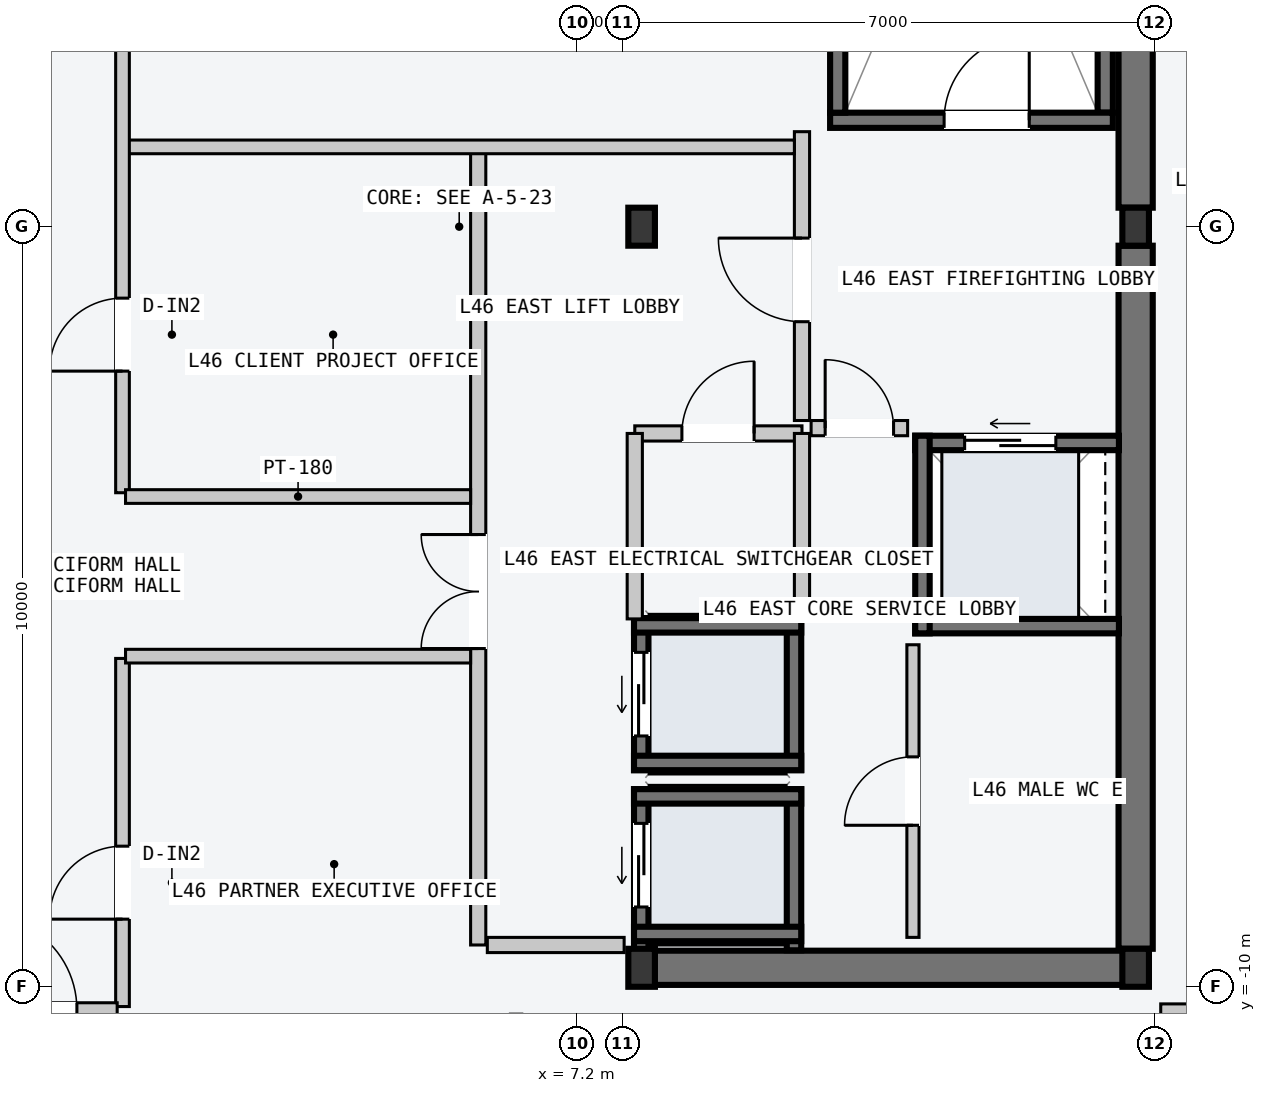
"""IFC4 building model, lengths in metres.
Left out: names, types, materials, properties, quantities, classifications, styles, units other than length and angle.
Written with IfcOpenShell. Run it as: python <this file> out.ifc"""

import sys

from ifc_helpers import new_model, si_unit, direction, frame, frame_2d, origin, origin_2d, place, context, subcontext, project, spatial, rectangle, i_section, extrude, element, fill, save


model = new_model("IFC4")
c1 = context("Model", 3, precision=1e-05, world=origin(), true_north=direction((0.0, 1.0)))
c2 = subcontext(c1, "Body", "Model", "MODEL_VIEW")
j1 = project(units=[si_unit("LENGTHUNIT", "METRE"), si_unit("PLANEANGLEUNIT", "RADIAN")], contexts=[c1])
p1 = place(None, origin())
s1 = spatial("IfcSite", under=j1, at=p1, CompositionType="ELEMENT")
p2 = place(p1, origin())
s2 = spatial("IfcBuilding", under=s1, at=p2, CompositionType="ELEMENT")
p3 = place(p2, frame((0.0, 0.0, 176.7)))
s3 = spatial("IfcBuildingStorey", under=s2, at=p3, CompositionType="ELEMENT", Elevation=176.7)
p4 = place(p3, frame((8.07, -9.75, -0.2), z_axis=(0.0, 0.0, 1.0), x_axis=(1.0, 0.0, 0.0)))
e1 = element("IfcWall", 1, at=p4, inside=s3, PredefinedType="SHEAR", context=c2, shape_type="SweptSolid", body=[
    extrude(rectangle(XDim=6.46, YDim=0.45, at=frame_2d((3.23, 0.0))), origin(), (0.0, 0.0, 1.0), 3.6),
])
for number, where, z_axis, x_axis in (
    (2, (14.55, -9.5, -0.2), (0.0, 0.0, 1.0), (0.0, 1.0, 0.0)),
    (3, (14.55, 0.25, -0.2), (0.0, 0.0, 1.0), (0.0, 1.0, 0.0)),
):
    element("IfcWall", number, at=place(p3, frame(where, z_axis=z_axis, x_axis=x_axis)), inside=s3, PredefinedType="SHEAR", context=c2, shape_type="SweptSolid", body=[
        extrude(rectangle(XDim=9.25, YDim=0.45, at=frame_2d((4.625, 0.0))), origin(), (0.0, 0.0, 1.0), 3.6),
    ])
p5 = place(p3, frame((14.15, 1.5, -0.2), z_axis=(0.0, 0.0, 1.0), x_axis=(0.0, 1.0, 0.0)))
e4 = element("IfcWall", 4, at=p5, inside=s3, PredefinedType="SOLIDWALL", context=c2, shape_type="SweptSolid", body=[
    extrude(rectangle(XDim=7.8, YDim=0.2, at=frame_2d((3.9, 0.0))), origin(), (0.0, 0.0, 1.0), 3.6),
])
p6 = place(p3, frame((10.53, 1.4, -0.2), z_axis=(0.0, 0.0, 1.0), x_axis=(1.0, 0.0, 0.0)))
e5 = element("IfcWall", 5, at=p6, inside=s3, PredefinedType="SOLIDWALL", context=c2, shape_type="SweptSolid", body=[
    extrude(rectangle(XDim=3.72, YDim=0.2, at=frame_2d((1.86, 0.0))), origin(), (0.0, 0.0, 1.0), 3.6),
])
p7 = place(p6, frame((1.5, 0.0, 0.2)))
e6 = element("IfcOpeningElement", 6, at=p7, cuts=e5, PredefinedType="OPENING", context=c2, shape_type="SweptSolid", body=[
    extrude(rectangle(XDim=1.12, YDim=2.18, at=frame_2d((0.56, 1.09))), frame((0.0, 0.11, 0.0), z_axis=(0.0, -1.0, 0.0), x_axis=(1.0, 0.0, 0.0)), (0.0, 0.0, 1.0), 0.22),
])
p8 = place(p3, frame((10.63, 1.5, -0.2), z_axis=(0.0, 0.0, 1.0), x_axis=(0.0, 1.0, 0.0)))
e7 = element("IfcWall", 7, at=p8, inside=s3, PredefinedType="SOLIDWALL", context=c2, shape_type="SweptSolid", body=[
    extrude(rectangle(XDim=7.8, YDim=0.2, at=frame_2d((3.9, 0.0))), origin(), (0.0, 0.0, 1.0), 3.6),
])
for number, where, z_axis, x_axis in (
    (8, (8.05, -9.75, 0.0), (0.0, 0.0, 1.0), (1.0, 0.0, 0.0)),
    (9, (8.05, 0.0, 0.0), (0.0, 0.0, 1.0), (1.0, 0.0, 0.0)),
    (10, (14.55, -9.75, 0.0), (0.0, 0.0, 1.0), (1.0, 0.0, 0.0)),
    (11, (14.55, 0.0, 0.0), (0.0, 0.0, 1.0), (1.0, 0.0, 0.0)),
):
    element("IfcColumn", number, at=place(p3, frame(where, z_axis=z_axis, x_axis=x_axis)), inside=s3, PredefinedType="COLUMN", context=c2, shape_type="SweptSolid", body=[
        extrude(i_section(OverallWidth=0.35, OverallDepth=0.5, WebThickness=0.02, FlangeThickness=0.032, at=origin_2d()), origin(), (0.0, 0.0, 1.0), 3.6),
    ])
p9 = place(p3, frame((8.045, -9.52, -0.2), z_axis=(0.0, 0.0, 1.0), x_axis=(0.0, 1.0, 0.0)))
e12 = element("IfcWall", 12, at=p9, inside=s3, PredefinedType="SOLIDWALL", context=c2, shape_type="SweptSolid", body=[
    extrude(rectangle(XDim=2.12, YDim=0.19, at=frame_2d((1.06, 0.0))), origin(), (0.0, 0.0, 1.0), 3.6),
])
p10 = place(p9, frame((0.57, 0.0, 0.2)))
e13 = element("IfcOpeningElement", 13, at=p10, cuts=e12, PredefinedType="OPENING", context=c2, shape_type="SweptSolid", body=[
    extrude(rectangle(XDim=1.1, YDim=2.2, at=frame_2d((0.55, 1.1))), frame((0.0, 0.105, 0.0), z_axis=(0.0, -1.0, 0.0), x_axis=(1.0, 0.0, 0.0)), (0.0, 0.0, 1.0), 0.21),
])
p11 = place(p3, frame((10.055, -9.52, -0.2), z_axis=(0.0, 0.0, 1.0), x_axis=(0.0, 1.0, 0.0)))
e14 = element("IfcWall", 14, at=p11, inside=s3, PredefinedType="SOLIDWALL", context=c2, shape_type="SweptSolid", body=[
    extrude(rectangle(XDim=2.12, YDim=0.19, at=frame_2d((1.06, 0.0))), origin(), (0.0, 0.0, 1.0), 3.6),
])
for number, where, z_axis, x_axis in (
    (15, (7.95, -7.495, -0.2), (0.0, 0.0, 1.0), (1.0, 0.0, 0.0)),
    (16, (7.95, -9.305, -0.2), (0.0, 0.0, 1.0), (1.0, 0.0, 0.0)),
):
    element("IfcWall", number, at=place(p3, frame(where, z_axis=z_axis, x_axis=x_axis)), inside=s3, PredefinedType="SOLIDWALL", context=c2, shape_type="SweptSolid", body=[
        extrude(rectangle(XDim=2.2, YDim=0.19, at=frame_2d((1.1, 0.0))), origin(), (0.0, 0.0, 1.0), 3.6),
    ])
p12 = place(p3, frame((8.045, -7.15, -0.2), z_axis=(0.0, 0.0, 1.0), x_axis=(0.0, 1.0, 0.0)))
e17 = element("IfcWall", 17, at=p12, inside=s3, PredefinedType="SOLIDWALL", context=c2, shape_type="SweptSolid", body=[
    extrude(rectangle(XDim=2.0, YDim=0.19, at=frame_2d((1.0, 0.0))), origin(), (0.0, 0.0, 1.0), 3.6),
])
p13 = place(p12, frame((0.45, 0.0, 0.2)))
e18 = element("IfcOpeningElement", 18, at=p13, cuts=e17, PredefinedType="OPENING", context=c2, shape_type="SweptSolid", body=[
    extrude(rectangle(XDim=1.1, YDim=2.2, at=frame_2d((0.55, 1.1))), frame((0.0, 0.105, 0.0), z_axis=(0.0, -1.0, 0.0), x_axis=(1.0, 0.0, 0.0)), (0.0, 0.0, 1.0), 0.21),
])
p14 = place(p3, frame((10.055, -7.15, -0.2), z_axis=(0.0, 0.0, 1.0), x_axis=(0.0, 1.0, 0.0)))
e19 = element("IfcWall", 19, at=p14, inside=s3, PredefinedType="SOLIDWALL", context=c2, shape_type="SweptSolid", body=[
    extrude(rectangle(XDim=2.0, YDim=0.19, at=frame_2d((1.0, 0.0))), origin(), (0.0, 0.0, 1.0), 3.6),
])
for number, where, z_axis, x_axis in (
    (20, (7.95, -5.245, -0.2), (0.0, 0.0, 1.0), (1.0, 0.0, 0.0)),
    (21, (7.95, -7.055, -0.2), (0.0, 0.0, 1.0), (1.0, 0.0, 0.0)),
):
    element("IfcWall", number, at=place(p3, frame(where, z_axis=z_axis, x_axis=x_axis)), inside=s3, PredefinedType="SOLIDWALL", context=c2, shape_type="SweptSolid", body=[
        extrude(rectangle(XDim=2.2, YDim=0.19, at=frame_2d((1.1, 0.0))), origin(), (0.0, 0.0, 1.0), 3.6),
    ])
p15 = place(p3, frame((11.65, -2.845, -0.2), z_axis=(0.0, 0.0, 1.0), x_axis=(1.0, 0.0, 0.0)))
e22 = element("IfcWall", 22, at=p15, inside=s3, PredefinedType="SOLIDWALL", context=c2, shape_type="SweptSolid", body=[
    extrude(rectangle(XDim=2.68, YDim=0.19, at=frame_2d((1.34, 0.0))), origin(), (0.0, 0.0, 1.0), 3.6),
])
p16 = place(p15, frame((0.65, 0.0, 0.2)))
e23 = element("IfcOpeningElement", 23, at=p16, cuts=e22, PredefinedType="OPENING", context=c2, shape_type="SweptSolid", body=[
    extrude(rectangle(XDim=1.2, YDim=2.2, at=frame_2d((0.6, 1.1))), frame((0.0, 0.105, 0.0), z_axis=(0.0, -1.0, 0.0), x_axis=(1.0, 0.0, 0.0)), (0.0, 0.0, 1.0), 0.21),
])
p17 = place(p3, frame((11.65, -5.255, -0.2), z_axis=(0.0, 0.0, 1.0), x_axis=(1.0, 0.0, 0.0)))
e24 = element("IfcWall", 24, at=p17, inside=s3, PredefinedType="SOLIDWALL", context=c2, shape_type="SweptSolid", body=[
    extrude(rectangle(XDim=2.68, YDim=0.19, at=frame_2d((1.34, 0.0))), origin(), (0.0, 0.0, 1.0), 3.6),
])
p18 = place(p3, frame((11.745, -5.35, -0.2), z_axis=(0.0, 0.0, 1.0), x_axis=(0.0, 1.0, 0.0)))
e25 = element("IfcWall", 25, at=p18, inside=s3, PredefinedType="SOLIDWALL", context=c2, shape_type="SweptSolid", body=[
    extrude(rectangle(XDim=2.6, YDim=0.19, at=frame_2d((1.3, 0.0))), origin(), (0.0, 0.0, 1.0), 3.6),
])
p19 = place(p3, frame((5.9, -9.45, 0.0), z_axis=(0.0, 0.0, 1.0), x_axis=(0.0, 1.0, 0.0)))
e26 = element("IfcWall", 26, at=p19, inside=s3, PredefinedType="PARTITIONING", context=c2, shape_type="SweptSolid", body=[
    extrude(rectangle(XDim=10.5, YDim=0.2, at=frame_2d((5.25, 0.0))), origin(), (0.0, 0.0, 1.0), 3.4),
])
p20 = place(p19, frame((3.9, 0.0, 0.0)))
e27 = element("IfcOpeningElement", 27, at=p20, cuts=e26, PredefinedType="OPENING", context=c2, shape_type="SweptSolid", body=[
    extrude(rectangle(XDim=1.5, YDim=2.2, at=frame_2d((0.75, 1.1))), frame((0.0, 0.11, 0.0), z_axis=(0.0, -1.0, 0.0), x_axis=(1.0, 0.0, 0.0)), (0.0, 0.0, 1.0), 0.22),
])
p21 = place(p3, frame((6.02, -9.45, 0.0), z_axis=(0.0, 0.0, 1.0), x_axis=(1.0, 0.0, 0.0)))
e28 = element("IfcWall", 28, at=p21, inside=s3, PredefinedType="PARTITIONING", context=c2, shape_type="SweptSolid", body=[
    extrude(rectangle(XDim=1.8, YDim=0.2, at=frame_2d((0.9, 0.0))), origin(), (0.0, 0.0, 1.0), 3.4),
])
p22 = place(p3, frame((10.16, -2.55, 0.0), z_axis=(0.0, 0.0, 1.0), x_axis=(0.0, 1.0, 0.0)))
e29 = element("IfcWall", 29, at=p22, inside=s3, PredefinedType="PARTITIONING", context=c2, shape_type="SweptSolid", body=[
    extrude(rectangle(XDim=3.8, YDim=0.2, at=frame_2d((1.9, 0.0))), origin(), (0.0, 0.0, 1.0), 3.4),
])
p23 = place(p22, frame((1.3, 0.0, 0.0)))
e30 = element("IfcOpeningElement", 30, at=p23, cuts=e29, PredefinedType="OPENING", context=c2, shape_type="SweptSolid", body=[
    extrude(rectangle(XDim=1.1, YDim=2.15, at=frame_2d((0.55, 1.075))), frame((0.0, 0.11, 0.0), z_axis=(0.0, -1.0, 0.0), x_axis=(1.0, 0.0, 0.0)), (0.0, 0.0, 1.0), 0.22),
])
p24 = place(p3, frame((10.28, -2.65, 0.0), z_axis=(0.0, 0.0, 1.0), x_axis=(1.0, 0.0, 0.0)))
e31 = element("IfcWall", 31, at=p24, inside=s3, PredefinedType="PARTITIONING", context=c2, shape_type="SweptSolid", body=[
    extrude(rectangle(XDim=1.27, YDim=0.2, at=frame_2d((0.635, 0.0))), origin(), (0.0, 0.0, 1.0), 3.4),
])
p25 = place(p24, frame((0.185, 0.0, 0.0)))
e32 = element("IfcOpeningElement", 32, at=p25, cuts=e31, PredefinedType="OPENING", context=c2, shape_type="SweptSolid", body=[
    extrude(rectangle(XDim=0.9, YDim=2.15, at=frame_2d((0.45, 1.075))), frame((0.0, 0.11, 0.0), z_axis=(0.0, -1.0, 0.0), x_axis=(1.0, 0.0, 0.0)), (0.0, 0.0, 1.0), 0.22),
])
p26 = place(p3, frame((7.96, -2.72, 0.0), z_axis=(0.0, 0.0, 1.0), x_axis=(1.0, 0.0, 0.0)))
e33 = element("IfcWall", 33, at=p26, inside=s3, PredefinedType="PARTITIONING", context=c2, shape_type="SweptSolid", body=[
    extrude(rectangle(XDim=2.2, YDim=0.2, at=frame_2d((1.1, 0.0))), origin(), (0.0, 0.0, 1.0), 3.4),
])
p27 = place(p26, frame((0.62, 0.0, 0.0)))
e34 = element("IfcOpeningElement", 34, at=p27, cuts=e33, PredefinedType="OPENING", context=c2, shape_type="SweptSolid", body=[
    extrude(rectangle(XDim=0.95, YDim=2.1, at=frame_2d((0.475, 1.05))), frame((0.0, 0.11, 0.0), z_axis=(0.0, -1.0, 0.0), x_axis=(1.0, 0.0, 0.0)), (0.0, 0.0, 1.0), 0.22),
])
for number, where, z_axis, x_axis in (
    (35, (7.96, -5.16, 0.0), (0.0, 0.0, 1.0), (0.0, 1.0, 0.0)),
    (36, (10.16, -5.16, 0.0), (0.0, 0.0, 1.0), (0.0, 1.0, 0.0)),
):
    element("IfcWall", number, at=place(p3, frame(where, z_axis=z_axis, x_axis=x_axis)), inside=s3, PredefinedType="PARTITIONING", context=c2, shape_type="SweptSolid", body=[
        extrude(rectangle(XDim=2.44, YDim=0.2, at=frame_2d((1.22, 0.0))), origin(), (0.0, 0.0, 1.0), 3.4),
    ])
p28 = place(p3, frame((11.62, -9.35, 0.0), z_axis=(0.0, 0.0, 1.0), x_axis=(0.0, 1.0, 0.0)))
e37 = element("IfcWall", 37, at=p28, inside=s3, PredefinedType="PARTITIONING", context=c2, shape_type="SweptSolid", body=[
    extrude(rectangle(XDim=3.85, YDim=0.16, at=frame_2d((1.925, 0.0))), origin(), (0.0, 0.0, 1.0), 3.4),
])
p29 = place(p28, frame((1.475, 0.0, 0.0)))
e38 = element("IfcOpeningElement", 38, at=p29, cuts=e37, PredefinedType="OPENING", context=c2, shape_type="SweptSolid", body=[
    extrude(rectangle(XDim=0.9, YDim=2.15, at=frame_2d((0.45, 1.075))), frame((0.0, 0.09, 0.0), z_axis=(0.0, -1.0, 0.0), x_axis=(1.0, 0.0, 0.0)), (0.0, 0.0, 1.0), 0.18),
])
p30 = place(p3, frame((1.26, 1.05, 0.0), z_axis=(0.0, 0.0, 1.0), x_axis=(1.0, 0.0, 0.0)))
e39 = element("IfcWall", 39, at=p30, inside=s3, PredefinedType="PARTITIONING", context=c2, shape_type="SweptSolid", body=[
    extrude(rectangle(XDim=8.8, YDim=0.18, at=frame_2d((4.4, 0.0))), origin(), (0.0, 0.0, 1.0), 3.4),
])
p31 = place(p3, frame((1.22, -3.5, 0.0), z_axis=(0.0, 0.0, 1.0), x_axis=(0.0, 1.0, 0.0)))
e40 = element("IfcWall", 40, at=p31, inside=s3, PredefinedType="PARTITIONING", context=c2, shape_type="SweptSolid", body=[
    extrude(rectangle(XDim=15.17, YDim=0.18, at=frame_2d((7.585, 0.0))), origin(), (0.0, 0.0, 1.0), 3.4),
])
p32 = place(p31, frame((6.1, 0.0, 0.0)))
e41 = element("IfcOpeningElement", 41, at=p32, cuts=e40, PredefinedType="OPENING", context=c2, shape_type="SweptSolid", body=[
    extrude(rectangle(XDim=1.24, YDim=2.24, at=frame_2d((0.62, 1.12))), frame((0.0, 0.1, 0.0), z_axis=(0.0, -1.0, 0.0), x_axis=(1.0, 0.0, 0.0)), (0.0, 0.0, 1.0), 0.2),
])
p33 = place(p31, frame((1.6, 0.0, 0.0)))
e42 = element("IfcOpeningElement", 42, at=p33, cuts=e40, PredefinedType="OPENING", context=c2, shape_type="SweptSolid", body=[
    extrude(rectangle(XDim=0.96, YDim=2.18, at=frame_2d((0.48, 1.09))), frame((0.0, 0.1, 0.0), z_axis=(0.0, -1.0, 0.0), x_axis=(1.0, 0.0, 0.0)), (0.0, 0.0, 1.0), 0.2),
])
p34 = place(p3, frame((1.26, -3.55, 0.0), z_axis=(0.0, 0.0, 1.0), x_axis=(1.0, 0.0, 0.0)))
e43 = element("IfcWall", 43, at=p34, inside=s3, PredefinedType="PARTITIONING", context=c2, shape_type="SweptSolid", body=[
    extrude(rectangle(XDim=4.54, YDim=0.18, at=frame_2d((2.27, 0.0))), origin(), (0.0, 0.0, 1.0), 3.4),
])
p35 = place(p3, frame((1.22, -10.26, 0.0), z_axis=(0.0, 0.0, 1.0), x_axis=(0.0, 1.0, 0.0)))
e44 = element("IfcWall", 44, at=p35, inside=s3, PredefinedType="PARTITIONING", context=c2, shape_type="SweptSolid", body=[
    extrude(rectangle(XDim=4.58, YDim=0.18, at=frame_2d((2.29, 0.0))), origin(), (0.0, 0.0, 1.0), 3.4),
])
p36 = place(p35, frame((1.15, 0.0, 0.0)))
e45 = element("IfcOpeningElement", 45, at=p36, cuts=e44, PredefinedType="OPENING", context=c2, shape_type="SweptSolid", body=[
    extrude(rectangle(XDim=0.96, YDim=2.18, at=frame_2d((0.48, 1.09))), frame((0.0, 0.1, 0.0), z_axis=(0.0, -1.0, 0.0), x_axis=(1.0, 0.0, 0.0)), (0.0, 0.0, 1.0), 0.2),
])
p37 = place(p3, frame((1.26, -5.65, 0.0), z_axis=(0.0, 0.0, 1.0), x_axis=(1.0, 0.0, 0.0)))
e46 = element("IfcWall", 46, at=p37, inside=s3, PredefinedType="PARTITIONING", context=c2, shape_type="SweptSolid", body=[
    extrude(rectangle(XDim=4.54, YDim=0.18, at=frame_2d((2.27, 0.0))), origin(), (0.0, 0.0, 1.0), 3.4),
])
p38 = place(p3, frame((-1.15, -10.3, 0.0), z_axis=(0.0, 0.0, 1.0), x_axis=(1.0, 0.0, 0.0)))
e47 = element("IfcWall", 47, at=p38, inside=s3, PredefinedType="PARTITIONING", context=c2, shape_type="SweptSolid", body=[
    extrude(rectangle(XDim=2.3, YDim=0.18, at=frame_2d((1.15, 0.0))), origin(), (0.0, 0.0, 1.0), 3.4),
])
p39 = place(p38, frame((0.53, 0.0, 0.0)))
e48 = element("IfcOpeningElement", 48, at=p39, cuts=e47, PredefinedType="OPENING", context=c2, shape_type="SweptSolid", body=[
    extrude(rectangle(XDim=1.24, YDim=2.24, at=frame_2d((0.62, 1.12))), frame((0.0, 0.1, 0.0), z_axis=(0.0, -1.0, 0.0), x_axis=(1.0, 0.0, 0.0)), (0.0, 0.0, 1.0), 0.2),
])
p40 = place(p3, frame((14.88, -10.3, 0.0), z_axis=(0.0, 0.0, 1.0), x_axis=(1.0, 0.0, 0.0)))
e49 = element("IfcWall", 49, at=p40, inside=s3, PredefinedType="PARTITIONING", context=c2, shape_type="SweptSolid", body=[
    extrude(rectangle(XDim=5.68, YDim=0.15, at=frame_2d((2.84, 0.0))), origin(), (0.0, 0.0, 1.0), 3.4),
])
p41 = place(p40, frame((2.36, 0.0, 0.0)))
e50 = element("IfcOpeningElement", 50, at=p41, cuts=e49, PredefinedType="OPENING", context=c2, shape_type="SweptSolid", body=[
    extrude(rectangle(XDim=0.96, YDim=2.18, at=frame_2d((0.48, 1.09))), frame((0.0, 0.085, 0.0), z_axis=(0.0, -1.0, 0.0), x_axis=(1.0, 0.0, 0.0)), (0.0, 0.0, 1.0), 0.17),
])
p42 = place(p7, origin())
e51 = element("IfcDoor", 51, at=p42, inside=s3, OperationType="SINGLE_SWING_RIGHT", PredefinedType="DOOR", context=c2, shape_type="SweptSolid", body=[
    extrude(rectangle(XDim=1.12, YDim=2.18, at=frame_2d((0.56, 1.09))), frame((0.0, 0.025, 0.0), z_axis=(0.0, -1.0, 0.0), x_axis=(1.0, 0.0, 0.0)), (0.0, 0.0, 1.0), 0.05),
])
fill(e6, e51)
p43 = place(p10, origin())
e52 = element("IfcDoor", 52, at=p43, inside=s3, OperationType="SLIDING_TO_LEFT", PredefinedType="DOOR", context=c2, shape_type="SweptSolid", body=[
    extrude(rectangle(XDim=1.1, YDim=2.2, at=frame_2d((0.55, 1.1))), frame((0.0, 0.025, 0.0), z_axis=(0.0, -1.0, 0.0), x_axis=(1.0, 0.0, 0.0)), (0.0, 0.0, 1.0), 0.05),
])
fill(e13, e52)
p44 = place(p13, origin())
e53 = element("IfcDoor", 53, at=p44, inside=s3, OperationType="SLIDING_TO_LEFT", PredefinedType="DOOR", context=c2, shape_type="SweptSolid", body=[
    extrude(rectangle(XDim=1.1, YDim=2.2, at=frame_2d((0.55, 1.1))), frame((0.0, 0.025, 0.0), z_axis=(0.0, -1.0, 0.0), x_axis=(1.0, 0.0, 0.0)), (0.0, 0.0, 1.0), 0.05),
])
fill(e18, e53)
p45 = place(p16, origin())
e54 = element("IfcDoor", 54, at=p45, inside=s3, OperationType="SLIDING_TO_LEFT", PredefinedType="DOOR", context=c2, shape_type="SweptSolid", body=[
    extrude(rectangle(XDim=1.2, YDim=2.2, at=frame_2d((0.6, 1.1))), frame((0.0, 0.025, 0.0), z_axis=(0.0, -1.0, 0.0), x_axis=(1.0, 0.0, 0.0)), (0.0, 0.0, 1.0), 0.05),
])
fill(e23, e54)
p46 = place(p20, origin())
e55 = element("IfcDoor", 55, at=p46, inside=s3, OperationType="DOUBLE_DOOR_SINGLE_SWING", PredefinedType="DOOR", context=c2, shape_type="SweptSolid", body=[
    extrude(rectangle(XDim=1.5, YDim=2.2, at=frame_2d((0.75, 1.1))), frame((0.0, 0.025, 0.0), z_axis=(0.0, -1.0, 0.0), x_axis=(1.0, 0.0, 0.0)), (0.0, 0.0, 1.0), 0.05),
])
fill(e27, e55)
p47 = place(p23, origin())
e56 = element("IfcDoor", 56, at=p47, inside=s3, OperationType="SINGLE_SWING_RIGHT", PredefinedType="DOOR", context=c2, shape_type="SweptSolid", body=[
    extrude(rectangle(XDim=1.1, YDim=2.15, at=frame_2d((0.55, 1.075))), frame((0.0, 0.025, 0.0), z_axis=(0.0, -1.0, 0.0), x_axis=(1.0, 0.0, 0.0)), (0.0, 0.0, 1.0), 0.05),
])
fill(e30, e56)
p48 = place(p25, origin())
e57 = element("IfcDoor", 57, at=p48, inside=s3, OperationType="SINGLE_SWING_LEFT", PredefinedType="DOOR", context=c2, shape_type="SweptSolid", body=[
    extrude(rectangle(XDim=0.9, YDim=2.15, at=frame_2d((0.45, 1.075))), frame((0.0, 0.025, 0.0), z_axis=(0.0, -1.0, 0.0), x_axis=(1.0, 0.0, 0.0)), (0.0, 0.0, 1.0), 0.05),
])
fill(e32, e57)
p49 = place(p27, origin())
e58 = element("IfcDoor", 58, at=p49, inside=s3, OperationType="SINGLE_SWING_RIGHT", PredefinedType="DOOR", context=c2, shape_type="SweptSolid", body=[
    extrude(rectangle(XDim=0.95, YDim=2.1, at=frame_2d((0.475, 1.05))), frame((0.0, 0.025, 0.0), z_axis=(0.0, -1.0, 0.0), x_axis=(1.0, 0.0, 0.0)), (0.0, 0.0, 1.0), 0.05),
])
fill(e34, e58)
p50 = place(p29, origin())
e59 = element("IfcDoor", 59, at=p50, inside=s3, OperationType="SINGLE_SWING_LEFT", PredefinedType="DOOR", context=c2, shape_type="SweptSolid", body=[
    extrude(rectangle(XDim=0.9, YDim=2.15, at=frame_2d((0.45, 1.075))), frame((0.0, 0.025, 0.0), z_axis=(0.0, -1.0, 0.0), x_axis=(1.0, 0.0, 0.0)), (0.0, 0.0, 1.0), 0.05),
])
fill(e38, e59)
p51 = place(p33, origin())
e60 = element("IfcDoor", 60, at=p51, inside=s3, OperationType="SINGLE_SWING_LEFT", PredefinedType="DOOR", context=c2, shape_type="SweptSolid", body=[
    extrude(rectangle(XDim=0.96, YDim=2.18, at=frame_2d((0.48, 1.09))), frame((0.0, 0.025, 0.0), z_axis=(0.0, -1.0, 0.0), x_axis=(1.0, 0.0, 0.0)), (0.0, 0.0, 1.0), 0.05),
])
fill(e42, e60)
p52 = place(p36, origin())
e61 = element("IfcDoor", 61, at=p52, inside=s3, OperationType="SINGLE_SWING_LEFT", PredefinedType="DOOR", context=c2, shape_type="SweptSolid", body=[
    extrude(rectangle(XDim=0.96, YDim=2.18, at=frame_2d((0.48, 1.09))), frame((0.0, 0.025, 0.0), z_axis=(0.0, -1.0, 0.0), x_axis=(1.0, 0.0, 0.0)), (0.0, 0.0, 1.0), 0.05),
])
fill(e45, e61)
p53 = place(p39, origin())
e62 = element("IfcDoor", 62, at=p53, inside=s3, OperationType="SINGLE_SWING_LEFT", PredefinedType="DOOR", context=c2, shape_type="SweptSolid", body=[
    extrude(rectangle(XDim=1.24, YDim=2.24, at=frame_2d((0.62, 1.12))), frame((0.0, 0.025, 0.0), z_axis=(0.0, -1.0, 0.0), x_axis=(1.0, 0.0, 0.0)), (0.0, 0.0, 1.0), 0.05),
])
fill(e48, e62)
save(model, sys.argv[1])
